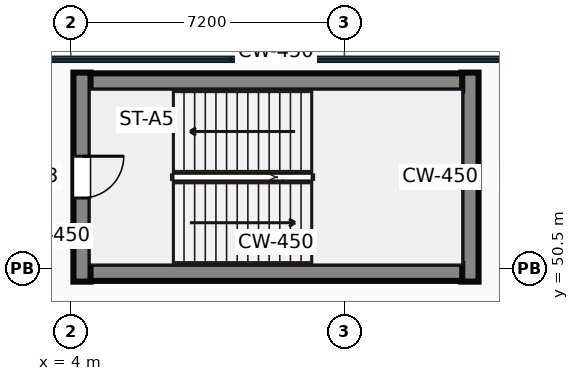
"""IFC4 building model, lengths in metres.
Left out: names, types, materials, properties, quantities, classifications, styles, units other than length and angle.
Written with IfcOpenShell. Run it as: python <this file> out.ifc"""

import sys

from ifc_helpers import new_model, si_unit, direction, frame, frame_2d, origin, place, context, subcontext, project, spatial, rectangle, extrude, source, transform, mapped, element, fill, save


model = new_model("IFC4")
c1 = context("Model", 3, precision=1e-05, world=origin(), true_north=direction((0.0, 1.0)))
c2 = subcontext(c1, "Body", "Model", "MODEL_VIEW")
j1 = project(units=[si_unit("LENGTHUNIT", "METRE"), si_unit("PLANEANGLEUNIT", "RADIAN")], contexts=[c1])
p1 = place(None, origin())
s1 = spatial("IfcSite", under=j1, at=p1, CompositionType="ELEMENT")
p2 = place(p1, origin())
s2 = spatial("IfcBuilding", under=s1, at=p2, CompositionType="ELEMENT")
p3 = place(p2, frame((0.0, 0.0, 16.0)))
s3 = spatial("IfcBuildingStorey", under=s2, at=p3, CompositionType="ELEMENT", Elevation=16.0)
m1 = source(origin(), c2, "Body", "SweptSolid", [
    extrude(rectangle(XDim=5.5, YDim=0.45, at=frame_2d((2.75, 0.0))), origin(), (0.0, 0.0, 1.0), 5.0),
])
p4 = place(p3, frame((4.295, 50.15, 0.0), z_axis=(0.0, 0.0, 1.0), x_axis=(0.0, 1.0, 0.0)))
e1 = element("IfcWall", 1, at=p4, inside=s3, PredefinedType="SHEAR", context=c2, shape_type="MappedRepresentation", body=[
    mapped(m1, transform((0.0, 0.0, 0.0))),
])
p5 = place(p4, frame((2.2, 0.0, 0.0)))
e2 = element("IfcOpeningElement", 2, at=p5, cuts=e1, PredefinedType="OPENING", context=c2, shape_type="SweptSolid", body=[
    extrude(rectangle(XDim=1.1, YDim=2.15, at=frame_2d((0.55, 1.075))), frame((0.0, 0.235, 0.0), z_axis=(0.0, -1.0, 0.0), x_axis=(1.0, 0.0, 0.0)), (0.0, 0.0, 1.0), 0.47),
])
m2 = source(origin(), c2, "Body", "SweptSolid", [
    extrude(rectangle(XDim=9.8, YDim=0.45, at=frame_2d((4.9, 0.0))), origin(), (0.0, 0.0, 1.0), 5.0),
])
for number, where, z_axis, x_axis in (
    (3, (4.5, 50.395, 0.0), (0.0, 0.0, 1.0), (1.0, 0.0, 0.0)),
    (4, (4.5, 55.405, 0.0), (0.0, 0.0, 1.0), (1.0, 0.0, 0.0)),
):
    element("IfcWall", number, at=place(p3, frame(where, z_axis=z_axis, x_axis=x_axis)), inside=s3, PredefinedType="SHEAR", context=c2, shape_type="MappedRepresentation", body=[
        mapped(m2, transform((0.0, 0.0, 0.0))),
    ])
p6 = place(p3, frame((14.505, 50.15, 0.0), z_axis=(0.0, 0.0, 1.0), x_axis=(0.0, 1.0, 0.0)))
e5 = element("IfcWall", 5, at=p6, inside=s3, PredefinedType="SHEAR", context=c2, shape_type="MappedRepresentation", body=[
    mapped(m1, transform((0.0, 0.0, 0.0))),
])
m3 = source(origin(), c2, "Body", "SweptSolid", [
    extrude(rectangle(XDim=1.1, YDim=2.15, at=frame_2d((0.55, 1.075))), frame((0.0, 0.025, 0.0), z_axis=(0.0, -1.0, 0.0), x_axis=(1.0, 0.0, 0.0)), (0.0, 0.0, 1.0), 0.05),
])
p7 = place(p5, frame((1.1, 0.0, 0.0), z_axis=(0.0, 0.0, 1.0), x_axis=(-1.0, 0.0, 0.0)))
e6 = element("IfcDoor", 6, at=p7, inside=s3, OperationType="SINGLE_SWING_RIGHT", PredefinedType="DOOR", context=c2, shape_type="MappedRepresentation", body=[
    mapped(m3, transform((0.0, 0.0, 0.0))),
])
fill(e2, e6)
save(model, sys.argv[1])
